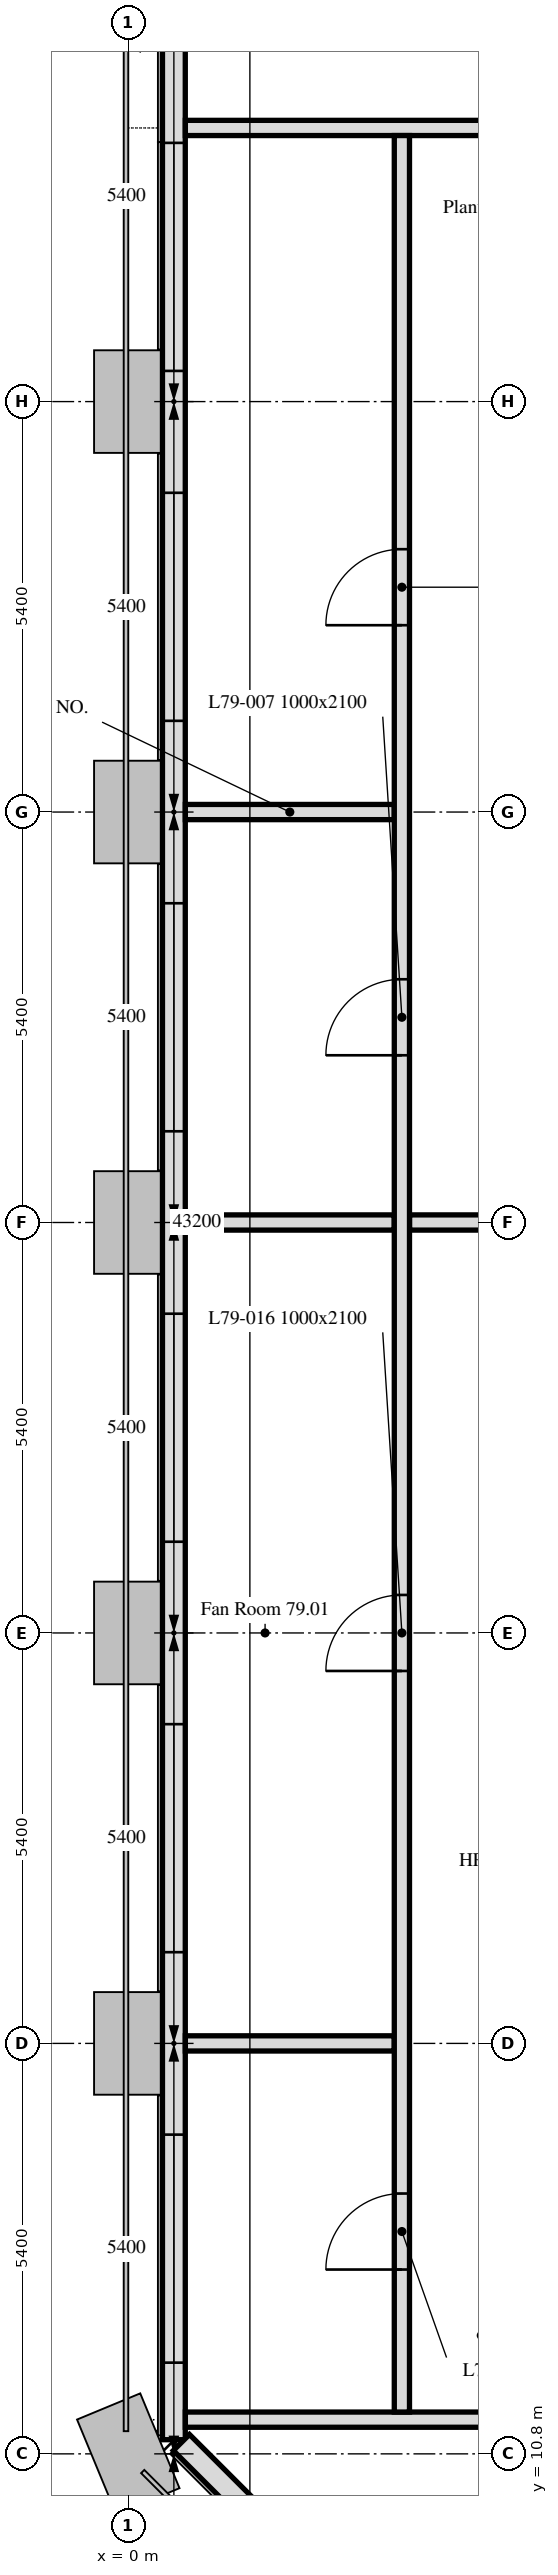
"""IFC4 building model, lengths in metres.
Left out: names, types, materials, properties, quantities, classifications, styles, units other than length and angle.
Written with IfcOpenShell. Run it as: python <this file> out.ifc"""

import sys

from ifc_helpers import new_model, si_unit, direction, frame, frame_2d, origin, place, context, subcontext, project, spatial, polyline, rectangle, outline, extrude, element, fill, save


model = new_model("IFC4")
c1 = context("Model", 3, precision=1e-05, world=origin(), true_north=direction((0.0, 1.0)))
c2 = subcontext(c1, "Body", "Model", "MODEL_VIEW")
j1 = project(units=[si_unit("LENGTHUNIT", "METRE"), si_unit("PLANEANGLEUNIT", "RADIAN")], contexts=[c1])
p1 = place(None, origin())
s1 = spatial("IfcSite", under=j1, at=p1, CompositionType="ELEMENT")
p2 = place(p1, origin())
s2 = spatial("IfcBuilding", under=s1, at=p2, CompositionType="ELEMENT")
p3 = place(p2, frame((0.0, 0.0, 317.2)))
s3 = spatial("IfcBuildingStorey", under=s2, at=p3, CompositionType="ELEMENT", Elevation=317.2)
p4 = place(p3, frame((0.6, 43.014, 0.0), z_axis=(0.0, 0.0, 1.0), x_axis=(0.0, -1.0, 0.0)))
e1 = element("IfcWall", 1, at=p4, inside=s3, PredefinedType="SOLIDWALL", context=c2, shape_type="SweptSolid", body=[
    extrude(outline(polyline([(0.0, 0.0), (32.027, 0.0), (32.027, 4.2), (31.434, 4.2), (30.841, 4.2), (30.248, 4.2), (29.655, 4.2), (29.062, 4.2), (28.469, 4.2), (27.875, 4.2), (27.282, 4.2), (26.689, 4.2), (26.096, 4.2), (25.503, 4.2), (24.91, 4.2), (24.317, 4.2), (23.724, 4.2), (23.131, 4.2), (22.538, 4.2), (21.945, 4.2), (21.352, 4.2), (20.758, 4.2), (20.165, 4.2), (19.572, 4.2), (18.979, 4.2), (18.386, 4.2), (17.793, 4.2), (17.2, 4.2), (16.607, 4.2), (16.014, 4.2), (15.42, 4.2), (14.827, 4.2), (14.234, 4.2), (13.641, 4.2), (13.048, 4.2), (12.455, 4.2), (11.862, 4.2), (11.269, 4.2), (10.676, 4.2), (10.083, 4.2), (9.49, 4.2), (8.896, 4.2), (8.303, 4.2), (7.71, 4.2), (7.117, 4.2), (6.524, 4.2), (5.931, 4.2), (5.338, 4.2), (4.745, 4.2), (4.152, 4.2), (3.559, 4.2), (2.966, 4.2), (2.372, 4.2), (1.779, 4.2), (1.186, 4.2), (0.593, 4.2), (0.0, 4.2), (0.0, 0.0)])), frame((0.0, 0.15, 0.0), z_axis=(0.0, -1.0, 0.0), x_axis=(1.0, 0.0, 0.0)), (0.0, 0.0, 1.0), 0.3),
])
p5 = place(p4, frame((1.81, 0.0, 0.6)))
e2 = element("IfcOpeningElement", 2, at=p5, cuts=e1, PredefinedType="OPENING", context=c2, shape_type="SweptSolid", body=[
    extrude(rectangle(XDim=3.0, YDim=1.8, at=frame_2d((1.5, 0.9))), frame((0.0, 0.16, 0.0), z_axis=(0.0, -1.0, 0.0), x_axis=(1.0, 0.0, 0.0)), (0.0, 0.0, 1.0), 0.32),
])
p6 = place(p4, frame((6.414, 0.0, 0.6)))
e3 = element("IfcOpeningElement", 3, at=p6, cuts=e1, PredefinedType="OPENING", context=c2, shape_type="SweptSolid", body=[
    extrude(rectangle(XDim=3.0, YDim=1.8, at=frame_2d((1.5, 0.9))), frame((0.0, 0.16, 0.0), z_axis=(0.0, -1.0, 0.0), x_axis=(1.0, 0.0, 0.0)), (0.0, 0.0, 1.0), 0.32),
])
p7 = place(p4, frame((11.814, 0.0, 0.6)))
e4 = element("IfcOpeningElement", 4, at=p7, cuts=e1, PredefinedType="OPENING", context=c2, shape_type="SweptSolid", body=[
    extrude(rectangle(XDim=3.0, YDim=1.8, at=frame_2d((1.5, 0.9))), frame((0.0, 0.16, 0.0), z_axis=(0.0, -1.0, 0.0), x_axis=(1.0, 0.0, 0.0)), (0.0, 0.0, 1.0), 0.32),
])
p8 = place(p4, frame((17.214, 0.0, 0.6)))
e5 = element("IfcOpeningElement", 5, at=p8, cuts=e1, PredefinedType="OPENING", context=c2, shape_type="SweptSolid", body=[
    extrude(rectangle(XDim=3.0, YDim=1.8, at=frame_2d((1.5, 0.9))), frame((0.0, 0.16, 0.0), z_axis=(0.0, -1.0, 0.0), x_axis=(1.0, 0.0, 0.0)), (0.0, 0.0, 1.0), 0.32),
])
p9 = place(p4, frame((22.614, 0.0, 0.6)))
e6 = element("IfcOpeningElement", 6, at=p9, cuts=e1, PredefinedType="OPENING", context=c2, shape_type="SweptSolid", body=[
    extrude(rectangle(XDim=3.0, YDim=1.8, at=frame_2d((1.5, 0.9))), frame((0.0, 0.16, 0.0), z_axis=(0.0, -1.0, 0.0), x_axis=(1.0, 0.0, 0.0)), (0.0, 0.0, 1.0), 0.32),
])
p10 = place(p4, frame((28.014, 0.0, 0.6)))
e7 = element("IfcOpeningElement", 7, at=p10, cuts=e1, PredefinedType="OPENING", context=c2, shape_type="SweptSolid", body=[
    extrude(rectangle(XDim=3.0, YDim=1.8, at=frame_2d((1.5, 0.9))), frame((0.0, 0.16, 0.0), z_axis=(0.0, -1.0, 0.0), x_axis=(1.0, 0.0, 0.0)), (0.0, 0.0, 1.0), 0.32),
])
p11 = place(p3, frame((0.699, 10.949, 0.0), z_axis=(0.0, 0.0, 1.0), x_axis=(0.707106781187, -0.707106781187, 0.0)))
e8 = element("IfcWall", 8, at=p11, inside=s3, PredefinedType="SOLIDWALL", context=c2, shape_type="SweptSolid", body=[
    extrude(outline(polyline([(0.0, 0.0), (6.86, 0.0), (6.86, 4.2), (6.288, 4.2), (5.716, 4.2), (5.145, 4.2), (4.573, 4.2), (4.001, 4.2), (3.43, 4.2), (2.858, 4.2), (2.287, 4.2), (1.715, 4.2), (1.143, 4.2), (0.572, 4.2), (0.0, 4.2), (0.0, 0.0)])), frame((0.0, 0.15, 0.0), z_axis=(0.0, -1.0, 0.0), x_axis=(1.0, 0.0, 0.0)), (0.0, 0.0, 1.0), 0.3),
])
p12 = place(p3, frame((0.751, 32.4, 0.0), z_axis=(0.0, 0.0, 1.0), x_axis=(1.0, 0.0, 0.0)))
e9 = element("IfcWall", 9, at=p12, inside=s3, PredefinedType="PARTITIONING", context=c2, shape_type="SweptSolid", body=[
    extrude(rectangle(XDim=2.749, YDim=0.2, at=frame_2d((1.375, 0.0))), origin(), (0.0, 0.0, 1.0), 3.45),
])
p13 = place(p3, frame((42.449, 41.4, 0.0), z_axis=(0.0, 0.0, 1.0), x_axis=(-1.0, 0.0, 0.0)))
e10 = element("IfcWall", 10, at=p13, inside=s3, PredefinedType="PARTITIONING", context=c2, shape_type="SweptSolid", body=[
    extrude(rectangle(XDim=41.698, YDim=0.2, at=frame_2d((20.849, 0.0))), origin(), (0.0, 0.0, 1.0), 3.45),
])
p14 = place(p13, frame((6.832, 0.0, 0.0)))
e11 = element("IfcOpeningElement", 11, at=p14, cuts=e10, PredefinedType="OPENING", context=c2, shape_type="SweptSolid", body=[
    extrude(rectangle(XDim=1.0, YDim=2.1, at=frame_2d((0.5, 1.05))), frame((0.0, 0.1, 0.0), z_axis=(0.0, -1.0, 0.0), x_axis=(1.0, 0.0, 0.0)), (0.0, 0.0, 1.0), 0.2),
])
p15 = place(p13, frame((17.649, 0.0, 0.0)))
e12 = element("IfcOpeningElement", 12, at=p15, cuts=e10, PredefinedType="OPENING", context=c2, shape_type="SweptSolid", body=[
    extrude(rectangle(XDim=1.0, YDim=2.1, at=frame_2d((0.5, 1.05))), frame((0.0, 0.1, 0.0), z_axis=(0.0, -1.0, 0.0), x_axis=(1.0, 0.0, 0.0)), (0.0, 0.0, 1.0), 0.2),
])
p16 = place(p13, frame((33.882, 0.0, 0.0)))
e13 = element("IfcOpeningElement", 13, at=p16, cuts=e10, PredefinedType="OPENING", context=c2, shape_type="SweptSolid", body=[
    extrude(rectangle(XDim=1.0, YDim=2.1, at=frame_2d((0.5, 1.05))), frame((0.0, 0.1, 0.0), z_axis=(0.0, -1.0, 0.0), x_axis=(1.0, 0.0, 0.0)), (0.0, 0.0, 1.0), 0.2),
])
p17 = place(p3, frame((0.751, 27.0, 0.0), z_axis=(0.0, 0.0, 1.0), x_axis=(1.0, 0.0, 0.0)))
e14 = element("IfcWall", 14, at=p17, inside=s3, PredefinedType="PARTITIONING", context=c2, shape_type="SweptSolid", body=[
    extrude(rectangle(XDim=2.749, YDim=0.2, at=frame_2d((1.375, 0.0))), origin(), (0.0, 0.0, 1.0), 3.45),
])
p18 = place(p3, frame((3.7, 27.0, 0.0), z_axis=(0.0, 0.0, 1.0), x_axis=(1.0, 0.0, 0.0)))
e15 = element("IfcWall", 15, at=p18, inside=s3, PredefinedType="PARTITIONING", context=c2, shape_type="SweptSolid", body=[
    extrude(rectangle(XDim=1.7, YDim=0.2, at=frame_2d((0.85, 0.0))), origin(), (0.0, 0.0, 1.0), 3.45),
])
p19 = place(p3, frame((3.5, 16.2, 0.0), z_axis=(0.0, 0.0, 1.0), x_axis=(-1.0, 0.0, 0.0)))
e16 = element("IfcWall", 16, at=p19, inside=s3, PredefinedType="PARTITIONING", context=c2, shape_type="SweptSolid", body=[
    extrude(rectangle(XDim=2.749, YDim=0.2, at=frame_2d((1.375, 0.0))), origin(), (0.0, 0.0, 1.0), 3.45),
])
p20 = place(p3, frame((0.751, 11.25, 0.0), z_axis=(0.0, 0.0, 1.0), x_axis=(1.0, 0.0, 0.0)))
e17 = element("IfcWall", 17, at=p20, inside=s3, PredefinedType="PARTITIONING", context=c2, shape_type="SweptSolid", body=[
    extrude(rectangle(XDim=41.698, YDim=0.2, at=frame_2d((20.849, 0.0))), origin(), (0.0, 0.0, 1.0), 4.2),
])
p21 = place(p20, frame((33.866, 0.0, 0.0)))
e18 = element("IfcOpeningElement", 18, at=p21, cuts=e17, PredefinedType="OPENING", context=c2, shape_type="SweptSolid", body=[
    extrude(rectangle(XDim=1.0, YDim=2.1, at=frame_2d((0.5, 1.05))), frame((0.0, 0.1, 0.0), z_axis=(0.0, -1.0, 0.0), x_axis=(1.0, 0.0, 0.0)), (0.0, 0.0, 1.0), 0.2),
])
p22 = place(p20, frame((28.449, 0.0, 0.0)))
e19 = element("IfcOpeningElement", 19, at=p22, cuts=e17, PredefinedType="OPENING", context=c2, shape_type="SweptSolid", body=[
    extrude(rectangle(XDim=1.0, YDim=2.1, at=frame_2d((0.5, 1.05))), frame((0.0, 0.1, 0.0), z_axis=(0.0, -1.0, 0.0), x_axis=(1.0, 0.0, 0.0)), (0.0, 0.0, 1.0), 0.2),
])
p23 = place(p20, frame((23.049, 0.0, 0.0)))
e20 = element("IfcOpeningElement", 20, at=p23, cuts=e17, PredefinedType="OPENING", context=c2, shape_type="SweptSolid", body=[
    extrude(rectangle(XDim=1.0, YDim=2.1, at=frame_2d((0.5, 1.05))), frame((0.0, 0.1, 0.0), z_axis=(0.0, -1.0, 0.0), x_axis=(1.0, 0.0, 0.0)), (0.0, 0.0, 1.0), 0.2),
])
p24 = place(p20, frame((17.499, 0.0, 0.0)))
e21 = element("IfcOpeningElement", 21, at=p24, cuts=e17, PredefinedType="OPENING", context=c2, shape_type="SweptSolid", body=[
    extrude(rectangle(XDim=1.0, YDim=2.1, at=frame_2d((0.5, 1.05))), frame((0.0, 0.1, 0.0), z_axis=(0.0, -1.0, 0.0), x_axis=(1.0, 0.0, 0.0)), (0.0, 0.0, 1.0), 0.2),
])
p25 = place(p3, frame((3.6, 11.35, 0.0), z_axis=(0.0, 0.0, 1.0), x_axis=(0.0, 1.0, 0.0)))
e22 = element("IfcWall", 22, at=p25, inside=s3, PredefinedType="PARTITIONING", context=c2, shape_type="SweptSolid", body=[
    extrude(rectangle(XDim=29.95, YDim=0.2, at=frame_2d((14.975, 0.0))), origin(), (0.0, 0.0, 1.0), 3.45),
])
p26 = place(p25, frame((23.508, 0.0, 0.0)))
e23 = element("IfcOpeningElement", 23, at=p26, cuts=e22, PredefinedType="OPENING", context=c2, shape_type="SweptSolid", body=[
    extrude(rectangle(XDim=1.0, YDim=2.1, at=frame_2d((0.5, 1.05))), frame((0.0, 0.1, 0.0), z_axis=(0.0, -1.0, 0.0), x_axis=(1.0, 0.0, 0.0)), (0.0, 0.0, 1.0), 0.2),
])
p27 = place(p25, frame((17.85, 0.0, 0.0)))
e24 = element("IfcOpeningElement", 24, at=p27, cuts=e22, PredefinedType="OPENING", context=c2, shape_type="SweptSolid", body=[
    extrude(rectangle(XDim=1.0, YDim=2.1, at=frame_2d((0.5, 1.05))), frame((0.0, 0.1, 0.0), z_axis=(0.0, -1.0, 0.0), x_axis=(1.0, 0.0, 0.0)), (0.0, 0.0, 1.0), 0.2),
])
p28 = place(p25, frame((1.875, 0.0, 0.0)))
e25 = element("IfcOpeningElement", 25, at=p28, cuts=e22, PredefinedType="OPENING", context=c2, shape_type="SweptSolid", body=[
    extrude(rectangle(XDim=1.0, YDim=2.1, at=frame_2d((0.5, 1.05))), frame((0.0, 0.1, 0.0), z_axis=(0.0, -1.0, 0.0), x_axis=(1.0, 0.0, 0.0)), (0.0, 0.0, 1.0), 0.2),
])
p29 = place(p25, frame((9.75, 0.0, 0.0)))
e26 = element("IfcOpeningElement", 26, at=p29, cuts=e22, PredefinedType="OPENING", context=c2, shape_type="SweptSolid", body=[
    extrude(rectangle(XDim=1.0, YDim=2.1, at=frame_2d((0.5, 1.05))), frame((0.0, 0.1, 0.0), z_axis=(0.0, -1.0, 0.0), x_axis=(1.0, 0.0, 0.0)), (0.0, 0.0, 1.0), 0.2),
])
p30 = place(p5, origin())
e27 = element("IfcWindow", 27, at=p30, inside=s3, PartitioningType="SINGLE_PANEL", PredefinedType="WINDOW", context=c2, shape_type="SweptSolid", body=[
    extrude(rectangle(XDim=3.0, YDim=1.8, at=frame_2d((1.5, 0.9))), frame((0.0, 0.03, 0.0), z_axis=(0.0, -1.0, 0.0), x_axis=(1.0, 0.0, 0.0)), (0.0, 0.0, 1.0), 0.06),
])
fill(e2, e27)
p31 = place(p6, origin())
e28 = element("IfcWindow", 28, at=p31, inside=s3, PartitioningType="SINGLE_PANEL", PredefinedType="WINDOW", context=c2, shape_type="SweptSolid", body=[
    extrude(rectangle(XDim=3.0, YDim=1.8, at=frame_2d((1.5, 0.9))), frame((0.0, 0.03, 0.0), z_axis=(0.0, -1.0, 0.0), x_axis=(1.0, 0.0, 0.0)), (0.0, 0.0, 1.0), 0.06),
])
fill(e3, e28)
p32 = place(p7, origin())
e29 = element("IfcWindow", 29, at=p32, inside=s3, PartitioningType="SINGLE_PANEL", PredefinedType="WINDOW", context=c2, shape_type="SweptSolid", body=[
    extrude(rectangle(XDim=3.0, YDim=1.8, at=frame_2d((1.5, 0.9))), frame((0.0, 0.03, 0.0), z_axis=(0.0, -1.0, 0.0), x_axis=(1.0, 0.0, 0.0)), (0.0, 0.0, 1.0), 0.06),
])
fill(e4, e29)
p33 = place(p8, origin())
e30 = element("IfcWindow", 30, at=p33, inside=s3, PartitioningType="SINGLE_PANEL", PredefinedType="WINDOW", context=c2, shape_type="SweptSolid", body=[
    extrude(rectangle(XDim=3.0, YDim=1.8, at=frame_2d((1.5, 0.9))), frame((0.0, 0.03, 0.0), z_axis=(0.0, -1.0, 0.0), x_axis=(1.0, 0.0, 0.0)), (0.0, 0.0, 1.0), 0.06),
])
fill(e5, e30)
p34 = place(p9, origin())
e31 = element("IfcWindow", 31, at=p34, inside=s3, PartitioningType="SINGLE_PANEL", PredefinedType="WINDOW", context=c2, shape_type="SweptSolid", body=[
    extrude(rectangle(XDim=3.0, YDim=1.8, at=frame_2d((1.5, 0.9))), frame((0.0, 0.03, 0.0), z_axis=(0.0, -1.0, 0.0), x_axis=(1.0, 0.0, 0.0)), (0.0, 0.0, 1.0), 0.06),
])
fill(e6, e31)
p35 = place(p10, origin())
e32 = element("IfcWindow", 32, at=p35, inside=s3, PartitioningType="SINGLE_PANEL", PredefinedType="WINDOW", context=c2, shape_type="SweptSolid", body=[
    extrude(rectangle(XDim=3.0, YDim=1.8, at=frame_2d((1.5, 0.9))), frame((0.0, 0.03, 0.0), z_axis=(0.0, -1.0, 0.0), x_axis=(1.0, 0.0, 0.0)), (0.0, 0.0, 1.0), 0.06),
])
fill(e7, e32)
p36 = place(p26, origin())
e33 = element("IfcDoor", 33, at=p36, inside=s3, OperationType="SINGLE_SWING_LEFT", PredefinedType="DOOR", context=c2, shape_type="SweptSolid", body=[
    extrude(rectangle(XDim=1.0, YDim=2.1, at=frame_2d((0.5, 1.05))), frame((0.0, 0.025, 0.0), z_axis=(0.0, -1.0, 0.0), x_axis=(1.0, 0.0, 0.0)), (0.0, 0.0, 1.0), 0.05),
])
fill(e23, e33)
p37 = place(p27, origin())
e34 = element("IfcDoor", 34, at=p37, inside=s3, OperationType="SINGLE_SWING_RIGHT", PredefinedType="DOOR", context=c2, shape_type="SweptSolid", body=[
    extrude(rectangle(XDim=1.0, YDim=2.1, at=frame_2d((0.5, 1.05))), frame((0.0, 0.025, 0.0), z_axis=(0.0, -1.0, 0.0), x_axis=(1.0, 0.0, 0.0)), (0.0, 0.0, 1.0), 0.05),
])
fill(e24, e34)
p38 = place(p28, origin())
e35 = element("IfcDoor", 35, at=p38, inside=s3, OperationType="SINGLE_SWING_LEFT", PredefinedType="DOOR", context=c2, shape_type="SweptSolid", body=[
    extrude(rectangle(XDim=1.0, YDim=2.1, at=frame_2d((0.5, 1.05))), frame((0.0, 0.025, 0.0), z_axis=(0.0, -1.0, 0.0), x_axis=(1.0, 0.0, 0.0)), (0.0, 0.0, 1.0), 0.05),
])
fill(e25, e35)
p39 = place(p29, origin())
e36 = element("IfcDoor", 36, at=p39, inside=s3, OperationType="SINGLE_SWING_RIGHT", PredefinedType="DOOR", context=c2, shape_type="SweptSolid", body=[
    extrude(rectangle(XDim=1.0, YDim=2.1, at=frame_2d((0.5, 1.05))), frame((0.0, 0.025, 0.0), z_axis=(0.0, -1.0, 0.0), x_axis=(1.0, 0.0, 0.0)), (0.0, 0.0, 1.0), 0.05),
])
fill(e26, e36)
save(model, sys.argv[1])
